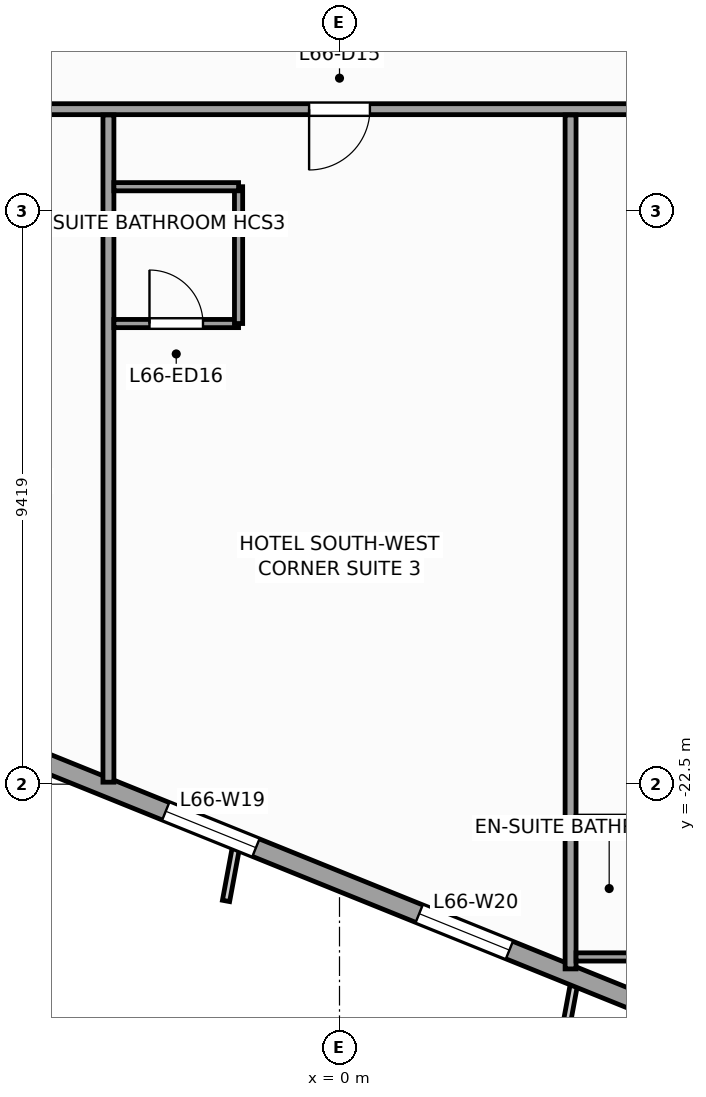
"""IFC4 building model, lengths in metres.
Left out: names, types, materials, properties, quantities, classifications, styles, units other than length and angle.
Written with IfcOpenShell. Run it as: python <this file> out.ifc"""

import sys

from ifc_helpers import new_model, si_unit, direction, frame, frame_2d, origin, place, context, subcontext, project, spatial, rectangle, extrude, source, transform, mapped, element, fill, save


model = new_model("IFC4")
c1 = context("Model", 3, precision=1e-05, world=origin(), true_north=direction((0.0, 1.0)))
c2 = subcontext(c1, "Body", "Model", "MODEL_VIEW")
j1 = project(units=[si_unit("LENGTHUNIT", "METRE"), si_unit("PLANEANGLEUNIT", "RADIAN")], contexts=[c1])
p1 = place(None, origin())
s1 = spatial("IfcSite", under=j1, at=p1, CompositionType="ELEMENT")
p2 = place(p1, origin())
s2 = spatial("IfcBuilding", under=s1, at=p2, CompositionType="ELEMENT")
p3 = place(p2, frame((0.0, 0.0, 272.4)))
s3 = spatial("IfcBuildingStorey", under=s2, at=p3, CompositionType="ELEMENT", Elevation=272.4)
p4 = place(p3, frame((-23.813, -14.479, 0.0), z_axis=(0.0, 0.0, 1.0), x_axis=(0.927182657188, -0.374609557019, 0.0)))
e1 = element("IfcWall", 1, at=p4, inside=s3, PredefinedType="STANDARD", context=c2, shape_type="SweptSolid", body=[
    extrude(rectangle(XDim=33.31, YDim=0.31, at=frame_2d((16.655, 0.0))), origin(), (0.0, 0.0, 1.0), 2.75),
])
p5 = place(p4, frame((3.197, 0.0, 0.47)))
e2 = element("IfcOpeningElement", 2, at=p5, cuts=e1, PredefinedType="OPENING", context=c2, shape_type="SweptSolid", body=[
    extrude(rectangle(XDim=1.6, YDim=2.1, at=frame_2d((0.8, 1.05))), frame((0.0, 0.165, 0.0), z_axis=(0.0, -1.0, 0.0), x_axis=(1.0, 0.0, 0.0)), (0.0, 0.0, 1.0), 0.33),
])
p6 = place(p4, frame((8.86, 0.0, 0.47)))
e3 = element("IfcOpeningElement", 3, at=p6, cuts=e1, PredefinedType="OPENING", context=c2, shape_type="SweptSolid", body=[
    extrude(rectangle(XDim=1.6, YDim=2.1, at=frame_2d((0.8, 1.05))), frame((0.0, 0.165, 0.0), z_axis=(0.0, -1.0, 0.0), x_axis=(1.0, 0.0, 0.0)), (0.0, 0.0, 1.0), 0.33),
])
p7 = place(p4, frame((14.439, 0.0, 0.47)))
e4 = element("IfcOpeningElement", 4, at=p7, cuts=e1, PredefinedType="OPENING", context=c2, shape_type="SweptSolid", body=[
    extrude(rectangle(XDim=1.6, YDim=2.1, at=frame_2d((0.8, 1.05))), frame((0.0, 0.165, 0.0), z_axis=(0.0, -1.0, 0.0), x_axis=(1.0, 0.0, 0.0)), (0.0, 0.0, 1.0), 0.33),
])
p8 = place(p4, frame((22.601, 0.0, 0.47)))
e5 = element("IfcOpeningElement", 5, at=p8, cuts=e1, PredefinedType="OPENING", context=c2, shape_type="SweptSolid", body=[
    extrude(rectangle(XDim=1.6, YDim=2.1, at=frame_2d((0.8, 1.05))), frame((0.0, 0.165, 0.0), z_axis=(0.0, -1.0, 0.0), x_axis=(1.0, 0.0, 0.0)), (0.0, 0.0, 1.0), 0.33),
])
p9 = place(p4, frame((27.097, 0.0, 0.47)))
e6 = element("IfcOpeningElement", 6, at=p9, cuts=e1, PredefinedType="OPENING", context=c2, shape_type="SweptSolid", body=[
    extrude(rectangle(XDim=1.6, YDim=2.1, at=frame_2d((0.8, 1.05))), frame((0.0, 0.165, 0.0), z_axis=(0.0, -1.0, 0.0), x_axis=(1.0, 0.0, 0.0)), (0.0, 0.0, 1.0), 0.33),
])
p10 = place(p3, frame((-10.3, -11.4, 0.0), z_axis=(0.0, 0.0, 1.0), x_axis=(1.0, 0.0, 0.0)))
e7 = element("IfcWall", 7, at=p10, inside=s3, PredefinedType="PARTITIONING", context=c2, shape_type="SweptSolid", body=[
    extrude(rectangle(XDim=21.7, YDim=0.18, at=frame_2d((10.85, 0.0))), origin(), (0.0, 0.0, 1.0), 3.35),
])
p11 = place(p10, frame((1.605, 0.0, 0.0)))
e8 = element("IfcOpeningElement", 8, at=p11, cuts=e7, PredefinedType="OPENING", context=c2, shape_type="SweptSolid", body=[
    extrude(rectangle(XDim=0.95, YDim=2.1, at=frame_2d((0.475, 1.05))), frame((0.0, 0.1, 0.0), z_axis=(0.0, -1.0, 0.0), x_axis=(1.0, 0.0, 0.0)), (0.0, 0.0, 1.0), 0.2),
])
p12 = place(p10, frame((17.236, 0.0, 0.0)))
e9 = element("IfcOpeningElement", 9, at=p12, cuts=e7, PredefinedType="OPENING", context=c2, shape_type="SweptSolid", body=[
    extrude(rectangle(XDim=1.0, YDim=2.15, at=frame_2d((0.5, 1.075))), frame((0.0, 0.1, 0.0), z_axis=(0.0, -1.0, 0.0), x_axis=(1.0, 0.0, 0.0)), (0.0, 0.0, 1.0), 0.2),
])
p13 = place(p10, frame((9.8, 0.0, 0.0)))
e10 = element("IfcOpeningElement", 10, at=p13, cuts=e7, PredefinedType="OPENING", context=c2, shape_type="SweptSolid", body=[
    extrude(rectangle(XDim=1.0, YDim=2.15, at=frame_2d((0.5, 1.075))), frame((0.0, 0.1, 0.0), z_axis=(0.0, -1.0, 0.0), x_axis=(1.0, 0.0, 0.0)), (0.0, 0.0, 1.0), 0.2),
])
p14 = place(p3, frame((3.8, -11.495, 0.0), z_axis=(0.0, 0.0, 1.0), x_axis=(0.0, -1.0, 0.0)))
e11 = element("IfcWall", 11, at=p14, inside=s3, PredefinedType="PARTITIONING", context=c2, shape_type="SweptSolid", body=[
    extrude(rectangle(XDim=14.043, YDim=0.18, at=frame_2d((7.021, 0.0))), origin(), (0.0, 0.0, 1.0), 3.35),
])
p15 = place(p3, frame((-3.8, -11.495, 0.0), z_axis=(0.0, 0.0, 1.0), x_axis=(0.0, -1.0, 0.0)))
e12 = element("IfcWall", 12, at=p15, inside=s3, PredefinedType="PARTITIONING", context=c2, shape_type="SweptSolid", body=[
    extrude(rectangle(XDim=10.972, YDim=0.18, at=frame_2d((5.486, 0.0))), origin(), (0.0, 0.0, 1.0), 3.02),
])
p16 = place(p3, frame((3.89, -25.342, 0.0), z_axis=(0.0, 0.0, 1.0), x_axis=(1.0, 0.0, 0.0)))
e13 = element("IfcWall", 13, at=p16, inside=s3, PredefinedType="PARTITIONING", context=c2, shape_type="SweptSolid", body=[
    extrude(rectangle(XDim=2.05, YDim=0.135, at=frame_2d((1.025, 0.0))), origin(), (0.0, 0.0, 1.0), 2.75),
])
p17 = place(p3, frame((3.89, -23.092, 0.0), z_axis=(0.0, 0.0, 1.0), x_axis=(1.0, 0.0, 0.0)))
e14 = element("IfcWall", 14, at=p17, inside=s3, PredefinedType="PARTITIONING", context=c2, shape_type="SweptSolid", body=[
    extrude(rectangle(XDim=2.05, YDim=0.135, at=frame_2d((1.025, 0.0))), origin(), (0.0, 0.0, 1.0), 2.95),
])
p18 = place(p3, frame((-3.71, -14.925, 0.0), z_axis=(0.0, 0.0, 1.0), x_axis=(1.0, 0.0, 0.0)))
e15 = element("IfcWall", 15, at=p18, inside=s3, PredefinedType="PARTITIONING", context=c2, shape_type="SweptSolid", body=[
    extrude(rectangle(XDim=2.05, YDim=0.135, at=frame_2d((1.025, 0.0))), origin(), (0.0, 0.0, 1.0), 3.35),
])
p19 = place(p18, frame((0.585, 0.0, 0.0)))
e16 = element("IfcOpeningElement", 16, at=p19, cuts=e15, PredefinedType="OPENING", context=c2, shape_type="SweptSolid", body=[
    extrude(rectangle(XDim=0.88, YDim=2.1, at=frame_2d((0.44, 1.05))), frame((0.0, 0.078, 0.0), z_axis=(0.0, -1.0, 0.0), x_axis=(1.0, 0.0, 0.0)), (0.0, 0.0, 1.0), 0.155),
])
p20 = place(p3, frame((-1.66, -14.925, 0.0), z_axis=(0.0, 0.0, 1.0), x_axis=(0.0, 1.0, 0.0)))
e17 = element("IfcWall", 17, at=p20, inside=s3, PredefinedType="PARTITIONING", context=c2, shape_type="SweptSolid", body=[
    extrude(rectangle(XDim=2.25, YDim=0.135, at=frame_2d((1.125, 0.0))), origin(), (0.0, 0.0, 1.0), 3.35),
])
p21 = place(p3, frame((-3.71, -12.675, 0.0), z_axis=(0.0, 0.0, 1.0), x_axis=(1.0, 0.0, 0.0)))
e18 = element("IfcWall", 18, at=p21, inside=s3, PredefinedType="PARTITIONING", context=c2, shape_type="SweptSolid", body=[
    extrude(rectangle(XDim=2.05, YDim=0.135, at=frame_2d((1.025, 0.0))), origin(), (0.0, 0.0, 1.0), 3.35),
])
m1 = source(origin(), c2, "Body", "SweptSolid", [
    extrude(rectangle(XDim=1.6, YDim=2.1, at=frame_2d((0.8, 1.05))), frame((0.0, 0.03, 0.0), z_axis=(0.0, -1.0, 0.0), x_axis=(1.0, 0.0, 0.0)), (0.0, 0.0, 1.0), 0.06),
])
p22 = place(p8, origin())
e19 = element("IfcWindow", 19, at=p22, inside=s3, PartitioningType="SINGLE_PANEL", PredefinedType="WINDOW", context=c2, shape_type="MappedRepresentation", body=[
    mapped(m1, transform((0.0, 0.0, 0.0), scale=1.0)),
])
fill(e5, e19)
p23 = place(p9, origin())
e20 = element("IfcWindow", 20, at=p23, inside=s3, PartitioningType="SINGLE_PANEL", PredefinedType="WINDOW", context=c2, shape_type="MappedRepresentation", body=[
    mapped(m1, transform((0.0, 0.0, 0.0), scale=1.0)),
])
fill(e6, e20)
m2 = source(origin(), c2, "Body", "SweptSolid", [
    extrude(rectangle(XDim=1.0, YDim=2.15, at=frame_2d((0.5, 1.075))), frame((0.0, 0.025, 0.0), z_axis=(0.0, -1.0, 0.0), x_axis=(1.0, 0.0, 0.0)), (0.0, 0.0, 1.0), 0.05),
])
p24 = place(p13, frame((1.0, 0.0, 0.0), z_axis=(0.0, 0.0, 1.0), x_axis=(-1.0, 0.0, 0.0)))
e21 = element("IfcDoor", 21, at=p24, inside=s3, OperationType="SINGLE_SWING_LEFT", PredefinedType="DOOR", context=c2, shape_type="MappedRepresentation", body=[
    mapped(m2, transform((0.0, 0.0, 0.0), scale=1.0)),
])
fill(e10, e21)
m3 = source(origin(), c2, "Body", "SweptSolid", [
    extrude(rectangle(XDim=0.88, YDim=2.1, at=frame_2d((0.44, 1.05))), frame((0.0, 0.025, 0.0), z_axis=(0.0, -1.0, 0.0), x_axis=(1.0, 0.0, 0.0)), (0.0, 0.0, 1.0), 0.05),
])
p25 = place(p19, origin())
e22 = element("IfcDoor", 22, at=p25, inside=s3, OperationType="SINGLE_SWING_LEFT", PredefinedType="DOOR", context=c2, shape_type="MappedRepresentation", body=[
    mapped(m3, transform((0.0, 0.0, 0.0), scale=1.0)),
])
fill(e16, e22)
save(model, sys.argv[1])
